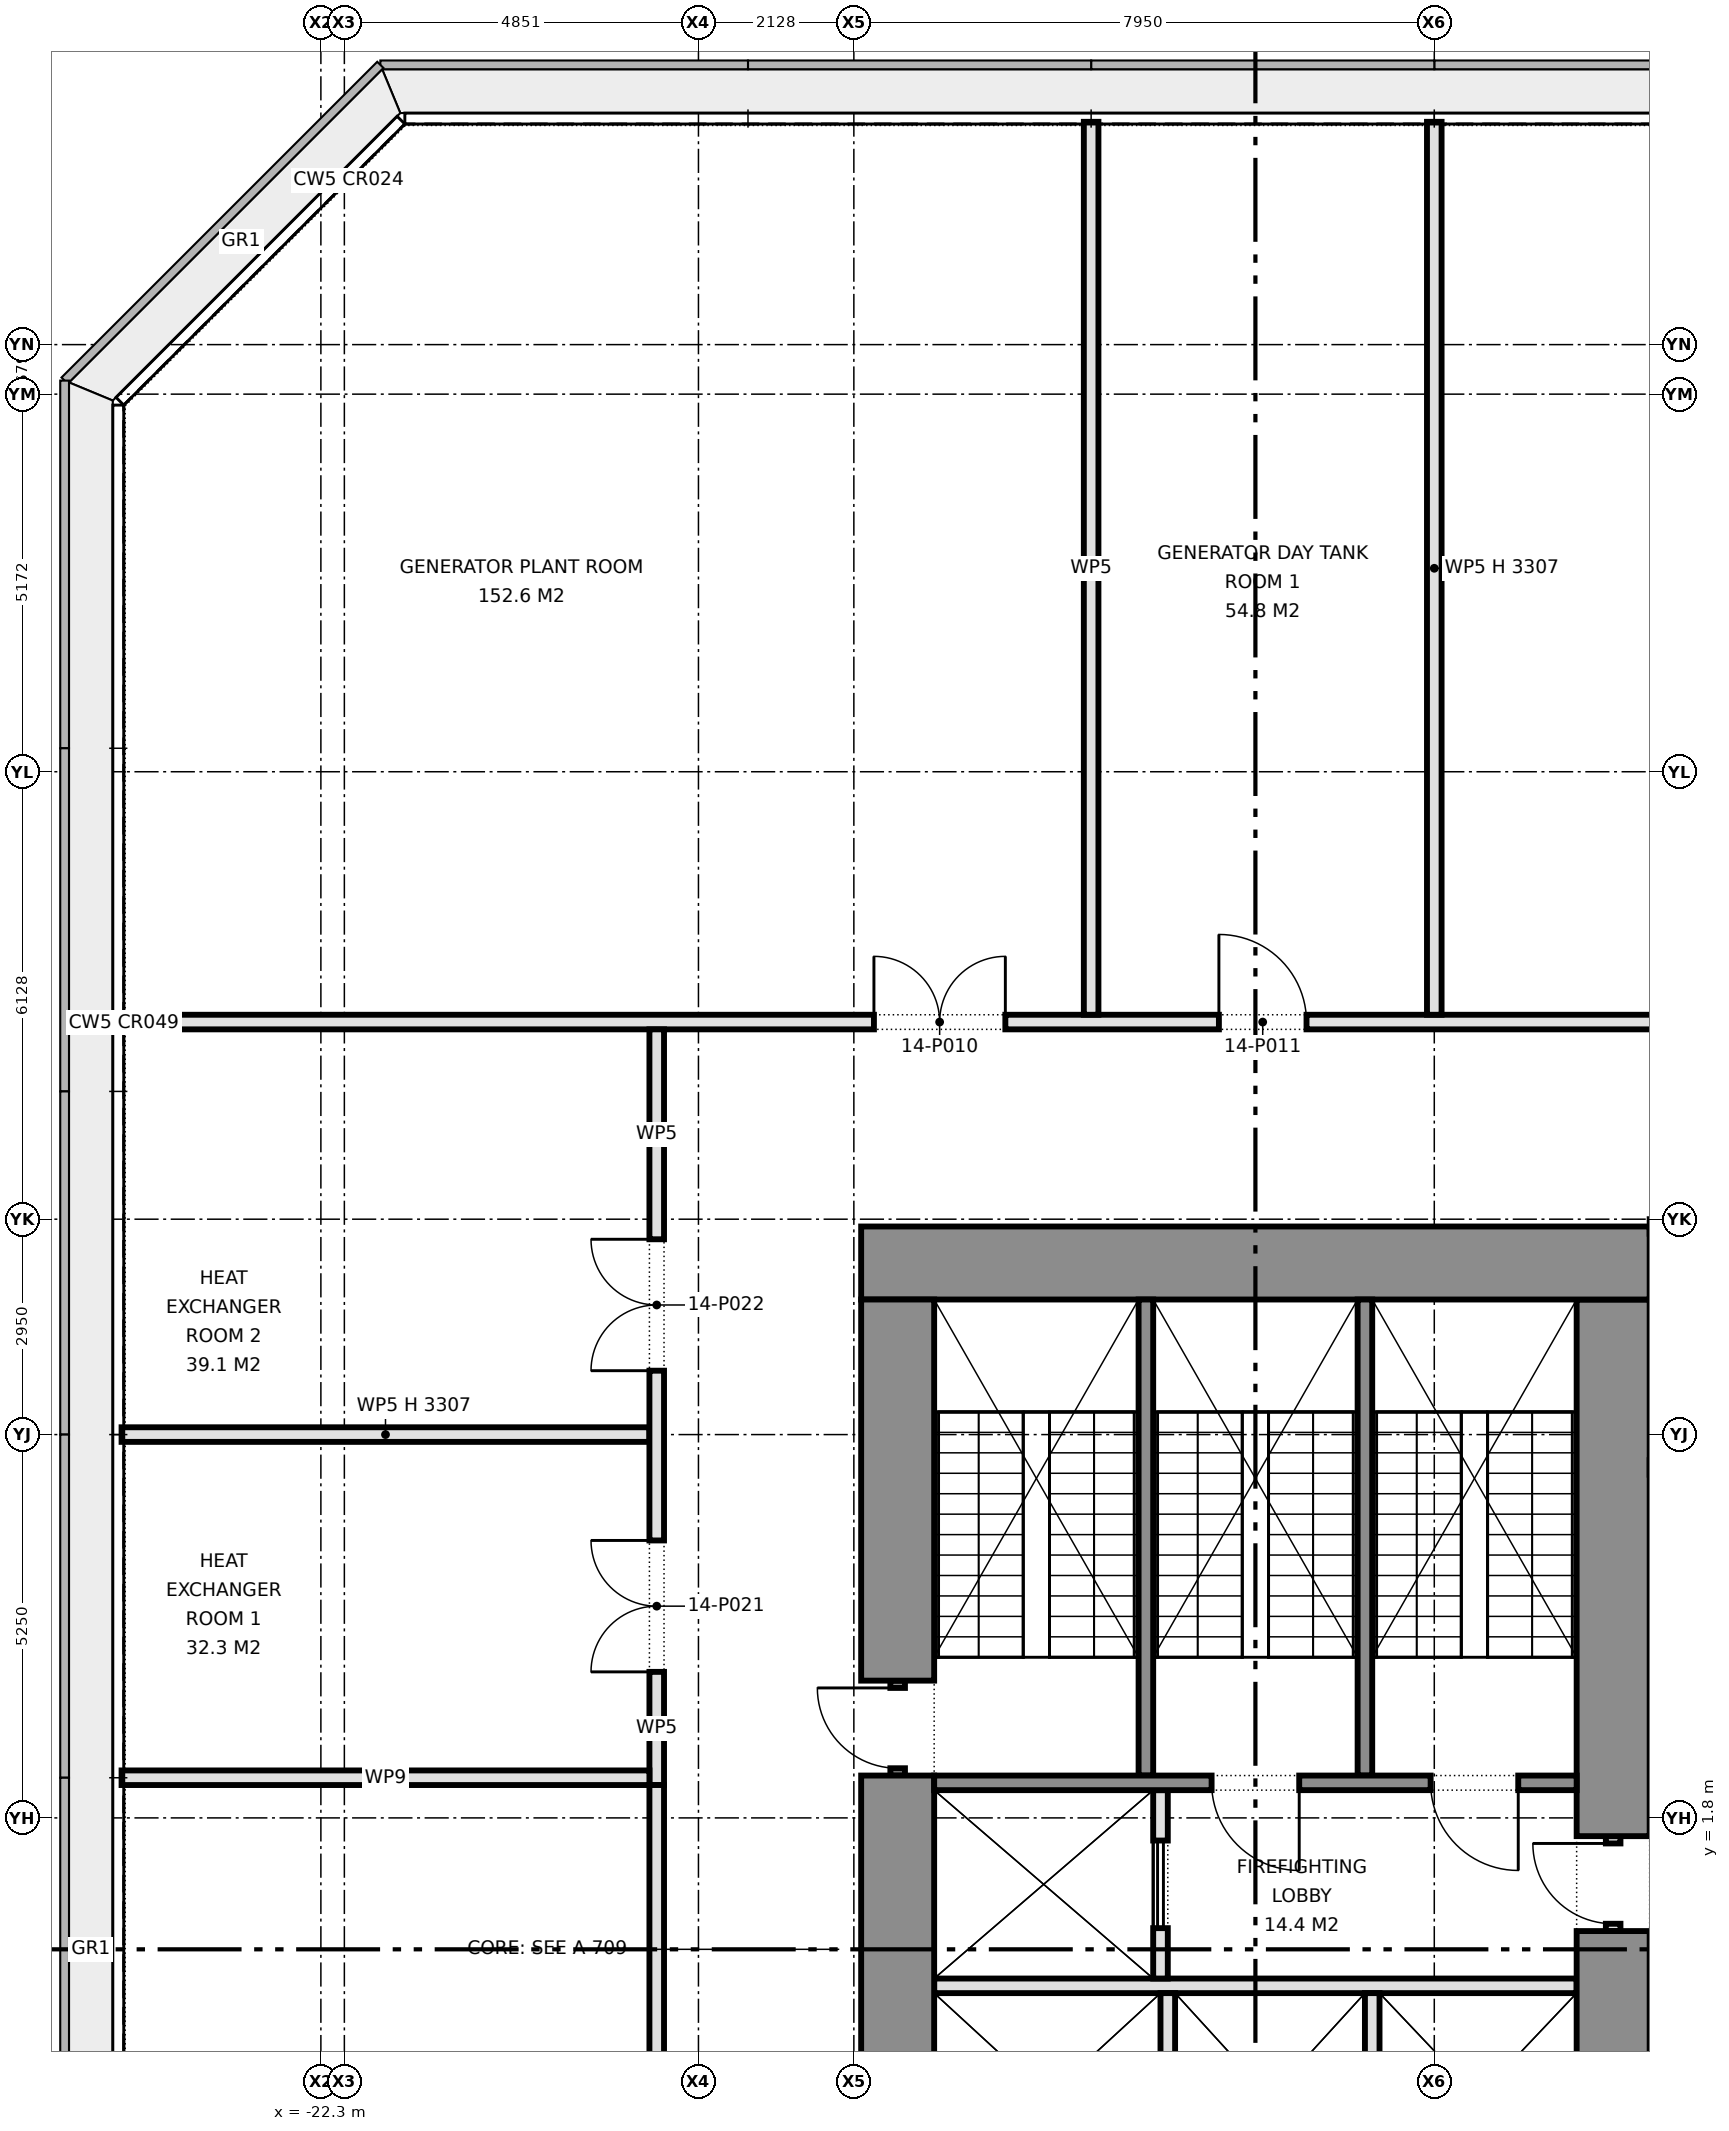
"""IFC4 building model, lengths in metres.
Left out: names, types, materials, properties, quantities, classifications, styles, units other than length and angle.
Written with IfcOpenShell. Run it as: python <this file> out.ifc"""

import sys

from ifc_helpers import new_model, si_unit, direction, frame, frame_2d, origin, place, context, subcontext, project, spatial, rectangle, extrude, element, fill, save


model = new_model("IFC4")
c1 = context("Model", 3, precision=1e-05, world=origin(), true_north=direction((0.0, 1.0)))
c2 = subcontext(c1, "Body", "Model", "MODEL_VIEW")
j1 = project(units=[si_unit("LENGTHUNIT", "METRE"), si_unit("PLANEANGLEUNIT", "RADIAN")], contexts=[c1])
p1 = place(None, origin())
s1 = spatial("IfcSite", under=j1, at=p1, CompositionType="ELEMENT")
p2 = place(p1, origin())
s2 = spatial("IfcBuilding", under=s1, at=p2, CompositionType="ELEMENT")
p3 = place(p2, frame((0.0, 0.0, 64.1)))
s3 = spatial("IfcBuildingStorey", under=s2, at=p3, CompositionType="ELEMENT", Elevation=64.1)
p4 = place(p3, frame((-14.9, 9.4, 0.0), z_axis=(0.0, 0.0, 1.0), x_axis=(1.0, 0.0, 0.0)))
e1 = element("IfcWall", 1, at=p4, inside=s3, PredefinedType="SHEAR", context=c2, shape_type="SweptSolid", body=[
    extrude(rectangle(XDim=10.8, YDim=1.0, at=frame_2d((5.4, 0.0))), origin(), (0.0, 0.0, 1.0), 4.3),
])
p5 = place(p3, frame((-14.4, -3.75, 0.0), z_axis=(0.0, 0.0, 1.0), x_axis=(0.0, 1.0, 0.0)))
e2 = element("IfcWall", 2, at=p5, inside=s3, PredefinedType="SHEAR", context=c2, shape_type="SweptSolid", body=[
    extrude(rectangle(XDim=6.13, YDim=1.0, at=frame_2d((3.065, 0.0))), origin(), (0.0, 0.0, 1.0), 4.3),
])
p6 = place(p3, frame((-14.4, 2.38, 0.0), z_axis=(0.0, 0.0, 1.0), x_axis=(0.0, 1.0, 0.0)))
e3 = element("IfcWall", 3, at=p6, inside=s3, PredefinedType="SHEAR", context=c2, shape_type="SweptSolid", body=[
    extrude(rectangle(XDim=1.3, YDim=0.2, at=frame_2d((0.65, 0.0))), origin(), (0.0, 0.0, 1.0), 2.4),
])
p7 = place(p6, frame((0.1, 0.0, 0.0)))
e4 = element("IfcOpeningElement", 4, at=p7, cuts=e3, PredefinedType="OPENING", context=c2, shape_type="SweptSolid", body=[
    extrude(rectangle(XDim=1.1, YDim=2.1, at=frame_2d((0.55, 1.05))), frame((0.0, 0.11, 0.0), z_axis=(0.0, -1.0, 0.0), x_axis=(1.0, 0.0, 0.0)), (0.0, 0.0, 1.0), 0.22),
])
p8 = place(p3, frame((-14.4, 3.68, 0.0), z_axis=(0.0, 0.0, 1.0), x_axis=(0.0, 1.0, 0.0)))
e5 = element("IfcWall", 5, at=p8, inside=s3, PredefinedType="SHEAR", context=c2, shape_type="SweptSolid", body=[
    extrude(rectangle(XDim=5.22, YDim=1.0, at=frame_2d((2.61, 0.0))), origin(), (0.0, 0.0, 1.0), 4.3),
])
p9 = place(p3, frame((-4.6, -3.75, 0.0), z_axis=(0.0, 0.0, 1.0), x_axis=(0.0, 1.0, 0.0)))
e6 = element("IfcWall", 6, at=p9, inside=s3, PredefinedType="SHEAR", context=c2, shape_type="SweptSolid", body=[
    extrude(rectangle(XDim=4.0, YDim=1.0, at=frame_2d((2.0, 0.0))), origin(), (0.0, 0.0, 1.0), 4.3),
])
p10 = place(p3, frame((-4.6, 0.25, 0.0), z_axis=(0.0, 0.0, 1.0), x_axis=(0.0, 1.0, 0.0)))
e7 = element("IfcWall", 7, at=p10, inside=s3, PredefinedType="PARTITIONING", context=c2, shape_type="SweptSolid", body=[
    extrude(rectangle(XDim=1.3, YDim=0.2, at=frame_2d((0.65, 0.0))), origin(), (0.0, 0.0, 1.0), 2.4),
])
p11 = place(p10, frame((0.1, 0.0, 0.0)))
e8 = element("IfcOpeningElement", 8, at=p11, cuts=e7, PredefinedType="OPENING", context=c2, shape_type="SweptSolid", body=[
    extrude(rectangle(XDim=1.1, YDim=2.1, at=frame_2d((0.55, 1.05))), frame((0.0, 0.11, 0.0), z_axis=(0.0, -1.0, 0.0), x_axis=(1.0, 0.0, 0.0)), (0.0, 0.0, 1.0), 0.22),
])
p12 = place(p3, frame((-4.6, 1.55, 0.0), z_axis=(0.0, 0.0, 1.0), x_axis=(0.0, 1.0, 0.0)))
e9 = element("IfcWall", 9, at=p12, inside=s3, PredefinedType="SHEAR", context=c2, shape_type="SweptSolid", body=[
    extrude(rectangle(XDim=7.35, YDim=1.0, at=frame_2d((3.675, 0.0))), origin(), (0.0, 0.0, 1.0), 4.3),
])
p13 = place(p3, frame((-13.9, -0.5, 0.0), z_axis=(0.0, 0.0, 1.0), x_axis=(1.0, 0.0, 0.0)))
e10 = element("IfcWall", 10, at=p13, inside=s3, PredefinedType="PARTITIONING", context=c2, shape_type="SweptSolid", body=[
    extrude(rectangle(XDim=8.8, YDim=0.2, at=frame_2d((4.4, 0.0))), origin(), (0.0, 0.0, 1.0), 4.3),
])
p14 = place(p3, frame((-10.8, -0.4, 0.0), z_axis=(0.0, 0.0, 1.0), x_axis=(0.0, 1.0, 0.0)))
e11 = element("IfcWall", 11, at=p14, inside=s3, PredefinedType="PARTITIONING", context=c2, shape_type="SweptSolid", body=[
    extrude(rectangle(XDim=2.58, YDim=0.2, at=frame_2d((1.29, 0.0))), origin(), (0.0, 0.0, 1.0), 4.3),
])
p15 = place(p14, frame((0.69, 0.0, 0.0)))
e12 = element("IfcOpeningElement", 12, at=p15, cuts=e11, PredefinedType="OPENING", context=c2, shape_type="SweptSolid", body=[
    extrude(rectangle(XDim=1.2, YDim=2.1, at=frame_2d((0.6, 1.05))), frame((0.0, 0.11, 0.0), z_axis=(0.0, -1.0, 0.0), x_axis=(1.0, 0.0, 0.0)), (0.0, 0.0, 1.0), 0.22),
])
p16 = place(p3, frame((-13.9, 2.28, 0.0), z_axis=(0.0, 0.0, 1.0), x_axis=(1.0, 0.0, 0.0)))
e13 = element("IfcWall", 13, at=p16, inside=s3, PredefinedType="SHEAR", context=c2, shape_type="SweptSolid", body=[
    extrude(rectangle(XDim=8.8, YDim=0.2, at=frame_2d((4.4, 0.0))), origin(), (0.0, 0.0, 1.0), 4.3),
])
p17 = place(p16, frame((3.8, 0.0, 0.0)))
e14 = element("IfcOpeningElement", 14, at=p17, cuts=e13, PredefinedType="OPENING", context=c2, shape_type="SweptSolid", body=[
    extrude(rectangle(XDim=1.2, YDim=2.1, at=frame_2d((0.6, 1.05))), frame((0.0, 0.11, 0.0), z_axis=(0.0, -1.0, 0.0), x_axis=(1.0, 0.0, 0.0)), (0.0, 0.0, 1.0), 0.22),
])
p18 = place(p16, frame((6.8, 0.0, 0.0)))
e15 = element("IfcOpeningElement", 15, at=p18, cuts=e13, PredefinedType="OPENING", context=c2, shape_type="SweptSolid", body=[
    extrude(rectangle(XDim=1.2, YDim=2.1, at=frame_2d((0.6, 1.05))), frame((0.0, 0.11, 0.0), z_axis=(0.0, -1.0, 0.0), x_axis=(1.0, 0.0, 0.0)), (0.0, 0.0, 1.0), 0.22),
])
for number, where, z_axis, x_axis in (
    (16, (-11.0, 2.38, 0.0), (0.0, 0.0, 1.0), (0.0, 1.0, 0.0)),
    (17, (-8.0, 2.38, 0.0), (0.0, 0.0, 1.0), (0.0, 1.0, 0.0)),
):
    element("IfcWall", number, at=place(p3, frame(where, z_axis=z_axis, x_axis=x_axis)), inside=s3, PredefinedType="SHEAR", context=c2, shape_type="SweptSolid", body=[
        extrude(rectangle(XDim=6.52, YDim=0.2, at=frame_2d((3.26, 0.0))), origin(), (0.0, 0.0, 1.0), 4.3),
    ])
for number, where, z_axis, x_axis in (
    (18, (-10.7, -3.45, 0.0), (0.0, 0.0, 1.0), (0.0, 1.0, 0.0)),
    (19, (-7.9, -3.45, 0.0), (0.0, 0.0, 1.0), (0.0, 1.0, 0.0)),
):
    element("IfcWall", number, at=place(p3, frame(where, z_axis=z_axis, x_axis=x_axis)), inside=s3, PredefinedType="PARTITIONING", context=c2, shape_type="SweptSolid", body=[
        extrude(rectangle(XDim=2.85, YDim=0.2, at=frame_2d((1.425, 0.0))), origin(), (0.0, 0.0, 1.0), 4.3),
    ])
p19 = place(p3, frame((-4.1, 6.6, 0.0), z_axis=(0.0, 0.0, 1.0), x_axis=(1.0, 0.0, 0.0)))
e20 = element("IfcWall", 20, at=p19, inside=s3, PredefinedType="PARTITIONING", context=c2, shape_type="SweptSolid", body=[
    extrude(rectangle(XDim=2.8, YDim=0.2, at=frame_2d((1.4, 0.0))), origin(), (0.0, 0.0, 1.0), 4.3),
])
p20 = place(p3, frame((-25.03, 7.05, 0.0), z_axis=(0.0, 0.0, 1.0), x_axis=(1.0, 0.0, 0.0)))
e21 = element("IfcWall", 21, at=p20, inside=s3, PredefinedType="PARTITIONING", context=c2, shape_type="SweptSolid", body=[
    extrude(rectangle(XDim=7.23, YDim=0.2, at=frame_2d((3.615, 0.0))), origin(), (0.0, 0.0, 1.0), 3.307),
])
p21 = place(p3, frame((-4.1, 9.9, 0.0), z_axis=(0.0, 0.0, 1.0), x_axis=(1.0, 0.0, 0.0)))
e22 = element("IfcWall", 22, at=p21, inside=s3, PredefinedType="PARTITIONING", context=c2, shape_type="SweptSolid", body=[
    extrude(rectangle(XDim=2.8, YDim=0.2, at=frame_2d((1.4, 0.0))), origin(), (0.0, 0.0, 1.0), 3.363),
])
p22 = place(p3, frame((-25.03, 12.7, 0.0), z_axis=(0.0, 0.0, 1.0), x_axis=(1.0, 0.0, 0.0)))
e23 = element("IfcWall", 23, at=p22, inside=s3, PredefinedType="PARTITIONING", context=c2, shape_type="SweptSolid", body=[
    extrude(rectangle(XDim=50.06, YDim=0.2, at=frame_2d((25.03, 0.0))), origin(), (0.0, 0.0, 1.0), 4.3),
])
p23 = place(p22, frame((10.305, 0.0, 0.0)))
e24 = element("IfcOpeningElement", 24, at=p23, cuts=e23, PredefinedType="OPENING", context=c2, shape_type="SweptSolid", body=[
    extrude(rectangle(XDim=1.8, YDim=2.1, at=frame_2d((0.9, 1.05))), frame((0.0, 0.11, 0.0), z_axis=(0.0, -1.0, 0.0), x_axis=(1.0, 0.0, 0.0)), (0.0, 0.0, 1.0), 0.22),
])
p24 = place(p22, frame((15.03, 0.0, 0.0)))
e25 = element("IfcOpeningElement", 25, at=p24, cuts=e23, PredefinedType="OPENING", context=c2, shape_type="SweptSolid", body=[
    extrude(rectangle(XDim=1.2, YDim=2.1, at=frame_2d((0.6, 1.05))), frame((0.0, 0.11, 0.0), z_axis=(0.0, -1.0, 0.0), x_axis=(1.0, 0.0, 0.0)), (0.0, 0.0, 1.0), 0.22),
])
p25 = place(p22, frame((22.08, 0.0, 0.0)))
e26 = element("IfcOpeningElement", 26, at=p25, cuts=e23, PredefinedType="OPENING", context=c2, shape_type="SweptSolid", body=[
    extrude(rectangle(XDim=1.2, YDim=2.1, at=frame_2d((0.6, 1.05))), frame((0.0, 0.11, 0.0), z_axis=(0.0, -1.0, 0.0), x_axis=(1.0, 0.0, 0.0)), (0.0, 0.0, 1.0), 0.22),
])
p26 = place(p22, frame((28.83, 0.0, 0.0)))
e27 = element("IfcOpeningElement", 27, at=p26, cuts=e23, PredefinedType="OPENING", context=c2, shape_type="SweptSolid", body=[
    extrude(rectangle(XDim=1.8, YDim=2.1, at=frame_2d((0.9, 1.05))), frame((0.0, 0.11, 0.0), z_axis=(0.0, -1.0, 0.0), x_axis=(1.0, 0.0, 0.0)), (0.0, 0.0, 1.0), 0.22),
])
p27 = place(p22, frame((36.51, 0.0, 0.0)))
e28 = element("IfcOpeningElement", 28, at=p27, cuts=e23, PredefinedType="OPENING", context=c2, shape_type="SweptSolid", body=[
    extrude(rectangle(XDim=1.8, YDim=2.1, at=frame_2d((0.9, 1.05))), frame((0.0, 0.11, 0.0), z_axis=(0.0, -1.0, 0.0), x_axis=(1.0, 0.0, 0.0)), (0.0, 0.0, 1.0), 0.22),
])
p28 = place(p3, frame((-7.05, 12.8, 0.0), z_axis=(0.0, 0.0, 1.0), x_axis=(0.0, 1.0, 0.0)))
e29 = element("IfcWall", 29, at=p28, inside=s3, PredefinedType="PARTITIONING", context=c2, shape_type="SweptSolid", body=[
    extrude(rectangle(XDim=12.23, YDim=0.2, at=frame_2d((6.115, 0.0))), origin(), (0.0, 0.0, 1.0), 3.307),
])
p29 = place(p3, frame((-11.75, 12.8, 0.0), z_axis=(0.0, 0.0, 1.0), x_axis=(0.0, 1.0, 0.0)))
e30 = element("IfcWall", 30, at=p29, inside=s3, PredefinedType="PARTITIONING", context=c2, shape_type="SweptSolid", body=[
    extrude(rectangle(XDim=12.23, YDim=0.2, at=frame_2d((6.115, 0.0))), origin(), (0.0, 0.0, 1.0), 4.3),
])
p30 = place(p3, frame((-17.7, 2.25, 0.0), z_axis=(0.0, 0.0, 1.0), x_axis=(0.0, 1.0, 0.0)))
e31 = element("IfcWall", 31, at=p30, inside=s3, PredefinedType="PARTITIONING", context=c2, shape_type="SweptSolid", body=[
    extrude(rectangle(XDim=10.35, YDim=0.2, at=frame_2d((5.175, 0.0))), origin(), (0.0, 0.0, 1.0), 4.3),
])
p31 = place(p30, frame((1.55, 0.0, 0.0)))
e32 = element("IfcOpeningElement", 32, at=p31, cuts=e31, PredefinedType="OPENING", context=c2, shape_type="SweptSolid", body=[
    extrude(rectangle(XDim=1.8, YDim=2.1, at=frame_2d((0.9, 1.05))), frame((0.0, 0.11, 0.0), z_axis=(0.0, -1.0, 0.0), x_axis=(1.0, 0.0, 0.0)), (0.0, 0.0, 1.0), 0.22),
])
p32 = place(p30, frame((5.675, 0.0, 0.0)))
e33 = element("IfcOpeningElement", 33, at=p32, cuts=e31, PredefinedType="OPENING", context=c2, shape_type="SweptSolid", body=[
    extrude(rectangle(XDim=1.8, YDim=2.1, at=frame_2d((0.9, 1.05))), frame((0.0, 0.11, 0.0), z_axis=(0.0, -1.0, 0.0), x_axis=(1.0, 0.0, 0.0)), (0.0, 0.0, 1.0), 0.22),
])
p33 = place(p3, frame((-25.03, 2.35, 0.0), z_axis=(0.0, 0.0, 1.0), x_axis=(1.0, 0.0, 0.0)))
e34 = element("IfcWall", 34, at=p33, inside=s3, PredefinedType="PARTITIONING", context=c2, shape_type="SweptSolid", body=[
    extrude(rectangle(XDim=7.23, YDim=0.2, at=frame_2d((3.615, 0.0))), origin(), (0.0, 0.0, 1.0), 4.3),
])
p34 = place(p3, frame((-17.7, -8.75, 0.0), z_axis=(0.0, 0.0, 1.0), x_axis=(0.0, 1.0, 0.0)))
e35 = element("IfcWall", 35, at=p34, inside=s3, PredefinedType="PARTITIONING", context=c2, shape_type="SweptSolid", body=[
    extrude(rectangle(XDim=11.0, YDim=0.2, at=frame_2d((5.5, 0.0))), origin(), (0.0, 0.0, 1.0), 4.3),
])
p35 = place(p7, origin())
e36 = element("IfcDoor", 36, at=p35, inside=s3, OperationType="SINGLE_SWING_RIGHT", PredefinedType="DOOR", context=c2, shape_type="SweptSolid", body=[
    extrude(rectangle(XDim=1.1, YDim=2.1, at=frame_2d((0.55, 1.05))), frame((0.0, 0.025, 0.0), z_axis=(0.0, -1.0, 0.0), x_axis=(1.0, 0.0, 0.0)), (0.0, 0.0, 1.0), 0.05),
])
fill(e4, e36)
p36 = place(p11, origin())
e37 = element("IfcDoor", 37, at=p36, inside=s3, OperationType="SINGLE_SWING_RIGHT", PredefinedType="DOOR", context=c2, shape_type="SweptSolid", body=[
    extrude(rectangle(XDim=1.1, YDim=2.1, at=frame_2d((0.55, 1.05))), frame((0.0, 0.025, 0.0), z_axis=(0.0, -1.0, 0.0), x_axis=(1.0, 0.0, 0.0)), (0.0, 0.0, 1.0), 0.05),
])
fill(e8, e37)
p37 = place(p15, origin())
e38 = element("IfcDoor", 38, at=p37, inside=s3, OperationType="DOUBLE_DOOR_SLIDING", PredefinedType="DOOR", context=c2, shape_type="SweptSolid", body=[
    extrude(rectangle(XDim=1.2, YDim=2.1, at=frame_2d((0.6, 1.05))), frame((0.0, 0.025, 0.0), z_axis=(0.0, -1.0, 0.0), x_axis=(1.0, 0.0, 0.0)), (0.0, 0.0, 1.0), 0.05),
])
fill(e12, e38)
p38 = place(p17, frame((1.2, 0.0, 0.0), z_axis=(0.0, 0.0, 1.0), x_axis=(-1.0, 0.0, 0.0)))
e39 = element("IfcDoor", 39, at=p38, inside=s3, OperationType="SINGLE_SWING_LEFT", PredefinedType="DOOR", context=c2, shape_type="SweptSolid", body=[
    extrude(rectangle(XDim=1.2, YDim=2.1, at=frame_2d((0.6, 1.05))), frame((0.0, 0.025, 0.0), z_axis=(0.0, -1.0, 0.0), x_axis=(1.0, 0.0, 0.0)), (0.0, 0.0, 1.0), 0.05),
])
fill(e14, e39)
p39 = place(p18, frame((1.2, 0.0, 0.0), z_axis=(0.0, 0.0, 1.0), x_axis=(-1.0, 0.0, 0.0)))
e40 = element("IfcDoor", 40, at=p39, inside=s3, OperationType="SINGLE_SWING_LEFT", PredefinedType="DOOR", context=c2, shape_type="SweptSolid", body=[
    extrude(rectangle(XDim=1.2, YDim=2.1, at=frame_2d((0.6, 1.05))), frame((0.0, 0.025, 0.0), z_axis=(0.0, -1.0, 0.0), x_axis=(1.0, 0.0, 0.0)), (0.0, 0.0, 1.0), 0.05),
])
fill(e15, e40)
p40 = place(p23, origin())
e41 = element("IfcDoor", 41, at=p40, inside=s3, OperationType="DOUBLE_DOOR_SINGLE_SWING", PredefinedType="DOOR", context=c2, shape_type="SweptSolid", body=[
    extrude(rectangle(XDim=1.8, YDim=2.1, at=frame_2d((0.9, 1.05))), frame((0.0, 0.025, 0.0), z_axis=(0.0, -1.0, 0.0), x_axis=(1.0, 0.0, 0.0)), (0.0, 0.0, 1.0), 0.05),
])
fill(e24, e41)
p41 = place(p24, origin())
e42 = element("IfcDoor", 42, at=p41, inside=s3, OperationType="SINGLE_SWING_LEFT", PredefinedType="DOOR", context=c2, shape_type="SweptSolid", body=[
    extrude(rectangle(XDim=1.2, YDim=2.1, at=frame_2d((0.6, 1.05))), frame((0.0, 0.025, 0.0), z_axis=(0.0, -1.0, 0.0), x_axis=(1.0, 0.0, 0.0)), (0.0, 0.0, 1.0), 0.05),
])
fill(e25, e42)
p42 = place(p31, origin())
e43 = element("IfcDoor", 43, at=p42, inside=s3, OperationType="DOUBLE_DOOR_SINGLE_SWING", PredefinedType="DOOR", context=c2, shape_type="SweptSolid", body=[
    extrude(rectangle(XDim=1.8, YDim=2.1, at=frame_2d((0.9, 1.05))), frame((0.0, 0.025, 0.0), z_axis=(0.0, -1.0, 0.0), x_axis=(1.0, 0.0, 0.0)), (0.0, 0.0, 1.0), 0.05),
])
fill(e32, e43)
p43 = place(p32, origin())
e44 = element("IfcDoor", 44, at=p43, inside=s3, OperationType="DOUBLE_DOOR_SINGLE_SWING", PredefinedType="DOOR", context=c2, shape_type="SweptSolid", body=[
    extrude(rectangle(XDim=1.8, YDim=2.1, at=frame_2d((0.9, 1.05))), frame((0.0, 0.025, 0.0), z_axis=(0.0, -1.0, 0.0), x_axis=(1.0, 0.0, 0.0)), (0.0, 0.0, 1.0), 0.05),
])
fill(e33, e44)
save(model, sys.argv[1])
